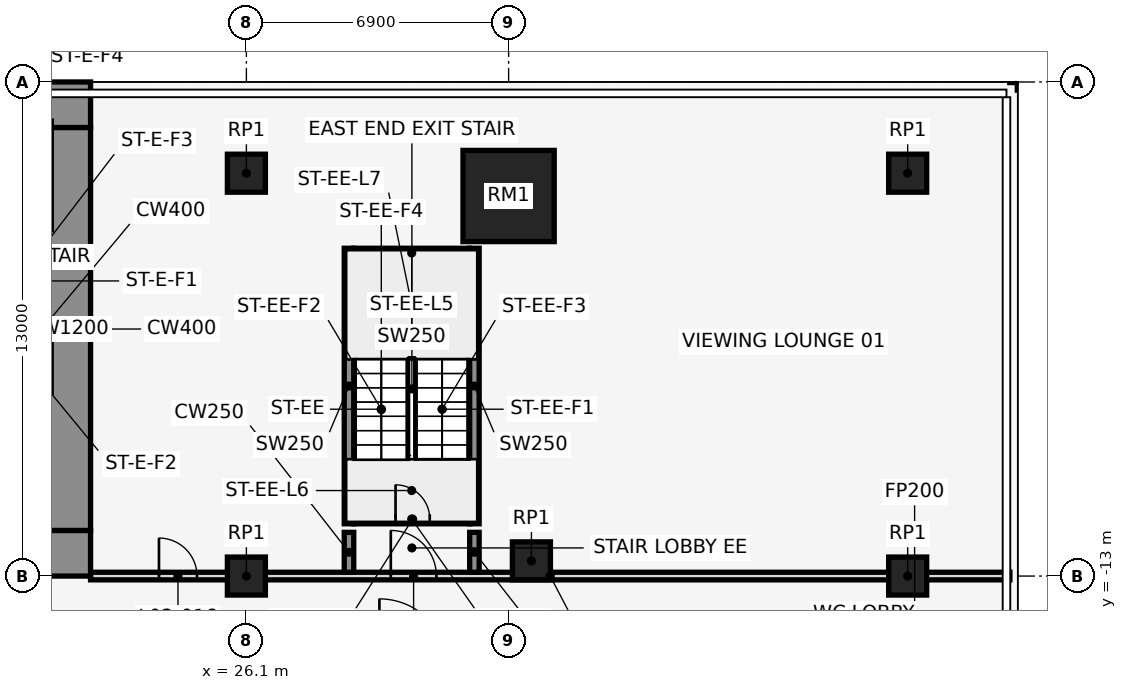
"""IFC4 building model, lengths in metres.
Left out: names, types, materials, properties, quantities, classifications, styles, units other than length and angle.
Written with IfcOpenShell. Run it as: python <this file> out.ifc"""

import sys

from ifc_helpers import new_model, si_unit, direction, frame, frame_2d, origin, origin_2d, place, context, subcontext, project, spatial, rectangle, extrude, element, fill, save


model = new_model("IFC4")
c1 = context("Model", 3, precision=1e-05, world=origin(), true_north=direction((0.0, 1.0)))
c2 = subcontext(c1, "Body", "Model", "MODEL_VIEW")
j1 = project(units=[si_unit("LENGTHUNIT", "METRE"), si_unit("PLANEANGLEUNIT", "RADIAN")], contexts=[c1])
p1 = place(None, origin())
s1 = spatial("IfcSite", under=j1, at=p1, CompositionType="ELEMENT")
p2 = place(p1, origin())
s2 = spatial("IfcBuilding", under=s1, at=p2, CompositionType="ELEMENT")
p3 = place(p2, frame((0.0, 0.0, 14.0)))
s3 = spatial("IfcBuildingStorey", under=s2, at=p3, CompositionType="ELEMENT", Elevation=14.0)
p4 = place(p3, frame((26.1, -2.4, 0.0), z_axis=(0.0, 0.0, 1.0), x_axis=(1.0, 0.0, 0.0)))
e1 = element("IfcColumn", 1, at=p4, inside=s3, PredefinedType="COLUMN", context=c2, shape_type="SweptSolid", body=[
    extrude(rectangle(XDim=1.0, YDim=1.0, at=origin_2d()), origin(), (0.0, 0.0, 1.0), 6.0),
])
p5 = place(p3, frame((33.0, -3.0, 0.0), z_axis=(0.0, 0.0, 1.0), x_axis=(1.0, 0.0, 0.0)))
e2 = element("IfcColumn", 2, at=p5, inside=s3, PredefinedType="COLUMN", context=c2, shape_type="SweptSolid", body=[
    extrude(rectangle(XDim=2.4, YDim=2.4, at=origin_2d()), origin(), (0.0, 0.0, 1.0), 6.0),
])
for number, where, z_axis, x_axis in (
    (3, (33.6, -12.6, 0.0), (0.0, 0.0, 1.0), (1.0, 0.0, 0.0)),
    (4, (26.1, -13.0, 0.0), (0.0, 0.0, 1.0), (1.0, 0.0, 0.0)),
    (5, (43.5, -2.4, 0.0), (0.0, 0.0, 1.0), (1.0, 0.0, 0.0)),
    (6, (43.5, -13.0, 0.0), (0.0, 0.0, 1.0), (1.0, 0.0, 0.0)),
):
    element("IfcColumn", number, at=place(p3, frame(where, z_axis=z_axis, x_axis=x_axis)), inside=s3, PredefinedType="COLUMN", context=c2, shape_type="SweptSolid", body=[
        extrude(rectangle(XDim=1.0, YDim=1.0, at=origin_2d()), origin(), (0.0, 0.0, 1.0), 6.0),
    ])
for number, where, z_axis, x_axis in (
    (7, (28.8, -11.625, 0.0), (0.0, 0.0, 1.0), (0.0, 1.0, 0.0)),
    (8, (32.1, -11.625, 0.0), (0.0, 0.0, 1.0), (0.0, 1.0, 0.0)),
):
    element("IfcWall", number, at=place(p3, frame(where, z_axis=z_axis, x_axis=x_axis)), inside=s3, PredefinedType="SHEAR", context=c2, shape_type="SweptSolid", body=[
        extrude(rectangle(XDim=7.25, YDim=0.25, at=frame_2d((3.625, 0.0))), origin(), (0.0, 0.0, 1.0), 6.0),
    ])
p6 = place(p3, frame((28.925, -11.5, 0.0), z_axis=(0.0, 0.0, 1.0), x_axis=(1.0, 0.0, 0.0)))
e9 = element("IfcWall", 9, at=p6, inside=s3, PredefinedType="SHEAR", context=c2, shape_type="SweptSolid", body=[
    extrude(rectangle(XDim=3.05, YDim=0.25, at=frame_2d((1.525, 0.0))), origin(), (0.0, 0.0, 1.0), 6.0),
])
p7 = place(p6, frame((1.1, 0.0, 0.0)))
e10 = element("IfcOpeningElement", 10, at=p7, cuts=e9, PredefinedType="OPENING", context=c2, shape_type="SweptSolid", body=[
    extrude(rectangle(XDim=0.9, YDim=2.1, at=frame_2d((0.45, 1.05))), frame((0.0, 0.137, 0.0), z_axis=(0.0, -1.0, 0.0), x_axis=(1.0, 0.0, 0.0)), (0.0, 0.0, 1.0), 0.274),
])
p8 = place(p3, frame((28.925, -4.5, 0.0), z_axis=(0.0, 0.0, 1.0), x_axis=(1.0, 0.0, 0.0)))
e11 = element("IfcWall", 11, at=p8, inside=s3, PredefinedType="SHEAR", context=c2, shape_type="SweptSolid", body=[
    extrude(rectangle(XDim=3.05, YDim=0.25, at=frame_2d((1.525, 0.0))), origin(), (0.0, 0.0, 1.0), 6.0),
])
p9 = place(p3, frame((22.0, -13.0, 0.0), z_axis=(0.0, 0.0, 1.0), x_axis=(1.0, 0.0, 0.0)))
e12 = element("IfcWall", 12, at=p9, inside=s3, PredefinedType="PARTITIONING", context=c2, shape_type="SweptSolid", body=[
    extrude(rectangle(XDim=24.19, YDim=0.2, at=frame_2d((12.095, 0.0))), origin(), (0.0, 0.0, 1.0), 5.7),
])
p10 = place(p9, frame((7.9, 0.0, 0.0)))
e13 = element("IfcOpeningElement", 13, at=p10, cuts=e12, PredefinedType="OPENING", context=c2, shape_type="SweptSolid", body=[
    extrude(rectangle(XDim=1.2, YDim=2.1, at=frame_2d((0.6, 1.05))), frame((0.0, 0.112, 0.0), z_axis=(0.0, -1.0, 0.0), x_axis=(1.0, 0.0, 0.0)), (0.0, 0.0, 1.0), 0.224),
])
p11 = place(p9, frame((1.8, 0.0, 0.0)))
e14 = element("IfcOpeningElement", 14, at=p11, cuts=e12, PredefinedType="OPENING", context=c2, shape_type="SweptSolid", body=[
    extrude(rectangle(XDim=1.0, YDim=2.1, at=frame_2d((0.5, 1.05))), frame((0.0, 0.112, 0.0), z_axis=(0.0, -1.0, 0.0), x_axis=(1.0, 0.0, 0.0)), (0.0, 0.0, 1.0), 0.224),
])
for number, where, z_axis, x_axis in (
    (15, (28.8, -12.9, 0.0), (0.0, 0.0, 1.0), (0.0, 1.0, 0.0)),
    (16, (32.1, -12.9, 0.0), (0.0, 0.0, 1.0), (0.0, 1.0, 0.0)),
):
    element("IfcWall", number, at=place(p3, frame(where, z_axis=z_axis, x_axis=x_axis)), inside=s3, PredefinedType="SHEAR", context=c2, shape_type="SweptSolid", body=[
        extrude(rectangle(XDim=1.05, YDim=0.25, at=frame_2d((0.525, 0.0))), origin(), (0.0, 0.0, 1.0), 6.0),
    ])
p12 = place(p3, frame((-22.0, -0.6, 0.0), z_axis=(0.0, 0.0, 1.0), x_axis=(1.0, 0.0, 0.0)))
e17 = element("IfcWall", 17, at=p12, inside=s3, PredefinedType="SHEAR", context=c2, shape_type="SweptSolid", body=[
    extrude(rectangle(XDim=44.0, YDim=1.2, at=frame_2d((22.0, 0.0))), origin(), (0.0, 0.0, 1.0), 6.0),
])
p13 = place(p3, frame((-22.0, -12.4, 0.0), z_axis=(0.0, 0.0, 1.0), x_axis=(1.0, 0.0, 0.0)))
e18 = element("IfcWall", 18, at=p13, inside=s3, PredefinedType="SHEAR", context=c2, shape_type="SweptSolid", body=[
    extrude(rectangle(XDim=44.0, YDim=1.2, at=frame_2d((22.0, 0.0))), origin(), (0.0, 0.0, 1.0), 6.0),
])
p14 = place(p13, frame((2.2, 0.0, 0.0)))
e19 = element("IfcOpeningElement", 19, at=p14, cuts=e18, PredefinedType="OPENING", context=c2, shape_type="SweptSolid", body=[
    extrude(rectangle(XDim=1.2, YDim=2.1, at=frame_2d((0.6, 1.05))), frame((0.0, 0.612, 0.0), z_axis=(0.0, -1.0, 0.0), x_axis=(1.0, 0.0, 0.0)), (0.0, 0.0, 1.0), 1.224),
])
p15 = place(p13, frame((21.4, 0.0, 0.0)))
e20 = element("IfcOpeningElement", 20, at=p15, cuts=e18, PredefinedType="OPENING", context=c2, shape_type="SweptSolid", body=[
    extrude(rectangle(XDim=1.2, YDim=2.1, at=frame_2d((0.6, 1.05))), frame((0.0, 0.612, 0.0), z_axis=(0.0, -1.0, 0.0), x_axis=(1.0, 0.0, 0.0)), (0.0, 0.0, 1.0), 1.224),
])
p16 = place(p13, frame((40.6, 0.0, 0.0)))
e21 = element("IfcOpeningElement", 21, at=p16, cuts=e18, PredefinedType="OPENING", context=c2, shape_type="SweptSolid", body=[
    extrude(rectangle(XDim=1.2, YDim=2.1, at=frame_2d((0.6, 1.05))), frame((0.0, 0.612, 0.0), z_axis=(0.0, -1.0, 0.0), x_axis=(1.0, 0.0, 0.0)), (0.0, 0.0, 1.0), 1.224),
])
p17 = place(p13, frame((16.0, 0.0, 0.0)))
e22 = element("IfcOpeningElement", 22, at=p17, cuts=e18, PredefinedType="OPENING", context=c2, shape_type="SweptSolid", body=[
    extrude(rectangle(XDim=1.8, YDim=2.1, at=frame_2d((0.9, 1.05))), frame((0.0, 0.612, 0.0), z_axis=(0.0, -1.0, 0.0), x_axis=(1.0, 0.0, 0.0)), (0.0, 0.0, 1.0), 1.224),
])
p18 = place(p13, frame((6.3, 0.0, 0.0)))
e23 = element("IfcOpeningElement", 23, at=p18, cuts=e18, PredefinedType="OPENING", context=c2, shape_type="SweptSolid", body=[
    extrude(rectangle(XDim=1.2, YDim=2.1, at=frame_2d((0.6, 1.05))), frame((0.0, 0.612, 0.0), z_axis=(0.0, -1.0, 0.0), x_axis=(1.0, 0.0, 0.0)), (0.0, 0.0, 1.0), 1.224),
])
p19 = place(p13, frame((26.2, 0.0, 0.0)))
e24 = element("IfcOpeningElement", 24, at=p19, cuts=e18, PredefinedType="OPENING", context=c2, shape_type="SweptSolid", body=[
    extrude(rectangle(XDim=1.8, YDim=2.1, at=frame_2d((0.9, 1.05))), frame((0.0, 0.612, 0.0), z_axis=(0.0, -1.0, 0.0), x_axis=(1.0, 0.0, 0.0)), (0.0, 0.0, 1.0), 1.224),
])
p20 = place(p13, frame((36.5, 0.0, 0.0)))
e25 = element("IfcOpeningElement", 25, at=p20, cuts=e18, PredefinedType="OPENING", context=c2, shape_type="SweptSolid", body=[
    extrude(rectangle(XDim=1.2, YDim=2.1, at=frame_2d((0.6, 1.05))), frame((0.0, 0.612, 0.0), z_axis=(0.0, -1.0, 0.0), x_axis=(1.0, 0.0, 0.0)), (0.0, 0.0, 1.0), 1.224),
])
p21 = place(p3, frame((21.4, -11.8, 0.0), z_axis=(0.0, 0.0, 1.0), x_axis=(0.0, 1.0, 0.0)))
e26 = element("IfcWall", 26, at=p21, inside=s3, PredefinedType="SHEAR", context=c2, shape_type="SweptSolid", body=[
    extrude(rectangle(XDim=10.6, YDim=1.2, at=frame_2d((5.3, 0.0))), origin(), (0.0, 0.0, 1.0), 6.0),
])
p22 = place(p10, origin())
e27 = element("IfcDoor", 27, at=p22, inside=s3, OperationType="SINGLE_SWING_LEFT", PredefinedType="DOOR", context=c2, shape_type="SweptSolid", body=[
    extrude(rectangle(XDim=1.2, YDim=2.1, at=frame_2d((0.6, 1.05))), frame((0.0, 0.025, 0.0), z_axis=(0.0, -1.0, 0.0), x_axis=(1.0, 0.0, 0.0)), (0.0, 0.0, 1.0), 0.05),
])
fill(e13, e27)
p23 = place(p7, origin())
e28 = element("IfcDoor", 28, at=p23, inside=s3, OperationType="SINGLE_SWING_RIGHT", PredefinedType="DOOR", context=c2, shape_type="SweptSolid", body=[
    extrude(rectangle(XDim=0.9, YDim=2.1, at=frame_2d((0.45, 1.05))), frame((0.0, 0.025, 0.0), z_axis=(0.0, -1.0, 0.0), x_axis=(1.0, 0.0, 0.0)), (0.0, 0.0, 1.0), 0.05),
])
fill(e10, e28)
p24 = place(p11, origin())
e29 = element("IfcDoor", 29, at=p24, inside=s3, OperationType="SINGLE_SWING_LEFT", PredefinedType="DOOR", context=c2, shape_type="SweptSolid", body=[
    extrude(rectangle(XDim=1.0, YDim=2.1, at=frame_2d((0.5, 1.05))), frame((0.0, 0.025, 0.0), z_axis=(0.0, -1.0, 0.0), x_axis=(1.0, 0.0, 0.0)), (0.0, 0.0, 1.0), 0.05),
])
fill(e14, e29)
save(model, sys.argv[1])
